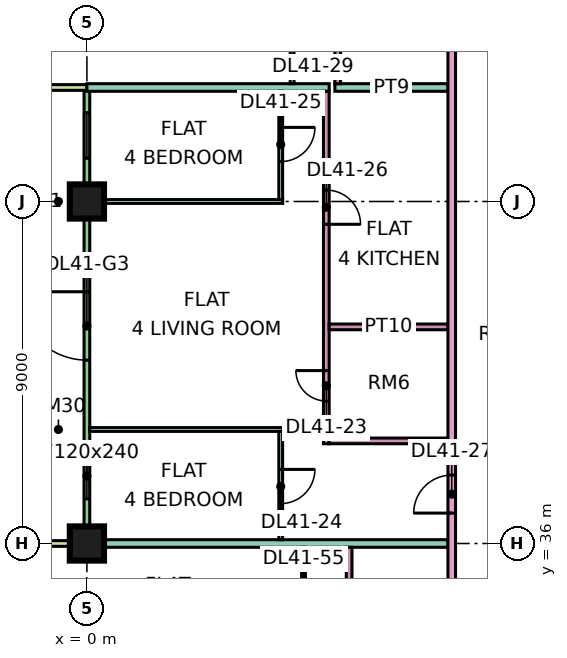
"""IFC4 building model, lengths in metres.
Left out: names, types, materials, properties, quantities, classifications, styles, units other than length and angle.
Written with IfcOpenShell. Run it as: python <this file> out.ifc"""

import sys

from ifc_helpers import new_model, si_unit, direction, frame, frame_2d, origin, origin_2d, place, context, subcontext, project, spatial, rectangle, extrude, element, fill, save


model = new_model("IFC4")
c1 = context("Model", 3, precision=1e-05, world=origin(), true_north=direction((0.0, 1.0)))
c2 = subcontext(c1, "Body", "Model", "MODEL_VIEW")
j1 = project(units=[si_unit("LENGTHUNIT", "METRE"), si_unit("PLANEANGLEUNIT", "RADIAN")], contexts=[c1])
p1 = place(None, origin())
s1 = spatial("IfcSite", under=j1, at=p1, CompositionType="ELEMENT")
p2 = place(p1, origin())
s2 = spatial("IfcBuilding", under=s1, at=p2, CompositionType="ELEMENT")
p3 = place(p2, frame((0.0, 0.0, 179.9)))
s3 = spatial("IfcBuildingStorey", under=s2, at=p3, CompositionType="ELEMENT", Elevation=179.9)
p4 = place(p3, frame((0.0, 36.0, 0.0), z_axis=(0.0, 0.0, 1.0), x_axis=(1.0, 0.0, 0.0)))
e1 = element("IfcColumn", 1, at=p4, inside=s3, PredefinedType="COLUMN", context=c2, shape_type="SweptSolid", body=[
    extrude(rectangle(XDim=0.9, YDim=0.9, at=origin_2d()), origin(), (0.0, 0.0, 1.0), 3.75),
])
p5 = place(p3, frame((0.0, 45.0, 0.0), z_axis=(0.0, 0.0, 1.0), x_axis=(1.0, 0.0, 0.0)))
e2 = element("IfcColumn", 2, at=p5, inside=s3, PredefinedType="COLUMN", context=c2, shape_type="SweptSolid", body=[
    extrude(rectangle(XDim=0.9, YDim=0.9, at=origin_2d()), origin(), (0.0, 0.0, 1.0), 3.75),
])
p6 = place(p3, frame((0.0, 47.925, 0.0), z_axis=(0.0, 0.0, 1.0), x_axis=(0.0, -1.0, 0.0)))
e3 = element("IfcWall", 3, at=p6, inside=s3, PredefinedType="SOLIDWALL", context=c2, shape_type="SweptSolid", body=[
    extrude(rectangle(XDim=11.85, YDim=0.15, at=frame_2d((5.925, 0.0))), origin(), (0.0, 0.0, 1.0), 3.35),
])
p7 = place(p6, frame((0.587, 0.0, 0.45)))
e4 = element("IfcOpeningElement", 4, at=p7, cuts=e3, PredefinedType="OPENING", context=c2, shape_type="SweptSolid", body=[
    extrude(rectangle(XDim=1.2, YDim=2.4, at=frame_2d((0.6, 1.2))), frame((0.0, 0.085, 0.0), z_axis=(0.0, -1.0, 0.0), x_axis=(1.0, 0.0, 0.0)), (0.0, 0.0, 1.0), 0.17),
])
p8 = place(p6, frame((5.3, 0.0, 0.0)))
e5 = element("IfcOpeningElement", 5, at=p8, cuts=e3, PredefinedType="OPENING", context=c2, shape_type="SweptSolid", body=[
    extrude(rectangle(XDim=1.8, YDim=2.4, at=frame_2d((0.9, 1.2))), frame((0.0, 0.085, 0.0), z_axis=(0.0, -1.0, 0.0), x_axis=(1.0, 0.0, 0.0)), (0.0, 0.0, 1.0), 0.17),
])
p9 = place(p6, frame((9.55, 0.0, 0.45)))
e6 = element("IfcOpeningElement", 6, at=p9, cuts=e3, PredefinedType="OPENING", context=c2, shape_type="SweptSolid", body=[
    extrude(rectangle(XDim=1.2, YDim=2.4, at=frame_2d((0.6, 1.2))), frame((0.0, 0.085, 0.0), z_axis=(0.0, -1.0, 0.0), x_axis=(1.0, 0.0, 0.0)), (0.0, 0.0, 1.0), 0.17),
])
for number, where, z_axis, x_axis in (
    (7, (-1.5, 48.0, 0.0), (0.0, 0.0, 1.0), (1.0, 0.0, 0.0)),
    (8, (-1.5, 36.0, 0.0), (0.0, 0.0, 1.0), (1.0, 0.0, 0.0)),
):
    element("IfcWall", number, at=place(p3, frame(where, z_axis=z_axis, x_axis=x_axis)), inside=s3, PredefinedType="SOLIDWALL", context=c2, shape_type="SweptSolid", body=[
        extrude(rectangle(XDim=1.5, YDim=0.15, at=frame_2d((0.75, 0.0))), origin(), (0.0, 0.0, 1.0), 3.35),
    ])
e9 = element("IfcWall", 9, at=p4, inside=s3, PredefinedType="PARTITIONING", context=c2, shape_type="SweptSolid", body=[
    extrude(rectangle(XDim=9.5, YDim=0.2, at=frame_2d((4.75, 0.0))), origin(), (0.0, 0.0, 1.0), 3.35),
])
p10 = place(p3, frame((0.0, 48.0, 0.0), z_axis=(0.0, 0.0, 1.0), x_axis=(1.0, 0.0, 0.0)))
e10 = element("IfcWall", 10, at=p10, inside=s3, PredefinedType="PARTITIONING", context=c2, shape_type="SweptSolid", body=[
    extrude(rectangle(XDim=6.375, YDim=0.2, at=frame_2d((3.188, 0.0))), origin(), (0.0, 0.0, 1.0), 3.35),
])
for number, where, z_axis, x_axis in (
    (11, (0.074, 39.0, 0.0), (0.0, 0.0, 1.0), (1.0, 0.0, 0.0)),
    (12, (0.074, 45.0, 0.0), (0.0, 0.0, 1.0), (1.0, 0.0, 0.0)),
):
    element("IfcWall", number, at=place(p3, frame(where, z_axis=z_axis, x_axis=x_axis)), inside=s3, PredefinedType="PARTITIONING", context=c2, shape_type="SweptSolid", body=[
        extrude(rectangle(XDim=5.076, YDim=0.1, at=frame_2d((2.538, 0.0))), origin(), (0.0, 0.0, 1.0), 3.35),
    ])
p11 = place(p3, frame((5.1, 36.1, 0.0), z_axis=(0.0, 0.0, 1.0), x_axis=(0.0, 1.0, 0.0)))
e13 = element("IfcWall", 13, at=p11, inside=s3, PredefinedType="PARTITIONING", context=c2, shape_type="SweptSolid", body=[
    extrude(rectangle(XDim=2.85, YDim=0.1, at=frame_2d((1.425, 0.0))), origin(), (0.0, 0.0, 1.0), 3.35),
])
p12 = place(p11, frame((0.95, 0.0, 0.0)))
e14 = element("IfcOpeningElement", 14, at=p12, cuts=e13, PredefinedType="OPENING", context=c2, shape_type="SweptSolid", body=[
    extrude(rectangle(XDim=0.9, YDim=2.1, at=frame_2d((0.45, 1.05))), frame((0.0, 0.06, 0.0), z_axis=(0.0, -1.0, 0.0), x_axis=(1.0, 0.0, 0.0)), (0.0, 0.0, 1.0), 0.12),
])
p13 = place(p3, frame((5.1, 45.05, 0.0), z_axis=(0.0, 0.0, 1.0), x_axis=(0.0, 1.0, 0.0)))
e15 = element("IfcWall", 15, at=p13, inside=s3, PredefinedType="PARTITIONING", context=c2, shape_type="SweptSolid", body=[
    extrude(rectangle(XDim=2.85, YDim=0.1, at=frame_2d((1.425, 0.0))), origin(), (0.0, 0.0, 1.0), 3.35),
])
p14 = place(p13, frame((1.0, 0.0, 0.0)))
e16 = element("IfcOpeningElement", 16, at=p14, cuts=e15, PredefinedType="OPENING", context=c2, shape_type="SweptSolid", body=[
    extrude(rectangle(XDim=0.9, YDim=2.1, at=frame_2d((0.45, 1.05))), frame((0.0, 0.06, 0.0), z_axis=(0.0, -1.0, 0.0), x_axis=(1.0, 0.0, 0.0)), (0.0, 0.0, 1.0), 0.12),
])
p15 = place(p3, frame((5.4, 48.1, 0.0), z_axis=(0.0, 0.0, 1.0), x_axis=(0.0, 1.0, 0.0)))
e17 = element("IfcWall", 17, at=p15, inside=s3, PredefinedType="PARTITIONING", context=c2, shape_type="SweptSolid", body=[
    extrude(rectangle(XDim=5.95, YDim=0.1, at=frame_2d((2.975, 0.0))), origin(), (0.0, 0.0, 1.0), 3.35),
])
p16 = place(p15, frame((0.95, 0.0, 0.0)))
e18 = element("IfcOpeningElement", 18, at=p16, cuts=e17, PredefinedType="OPENING", context=c2, shape_type="SweptSolid", body=[
    extrude(rectangle(XDim=0.9, YDim=2.1, at=frame_2d((0.45, 1.05))), frame((0.0, 0.06, 0.0), z_axis=(0.0, -1.0, 0.0), x_axis=(1.0, 0.0, 0.0)), (0.0, 0.0, 1.0), 0.12),
])
p17 = place(p15, frame((3.95, 0.0, 0.0)))
e19 = element("IfcOpeningElement", 19, at=p17, cuts=e17, PredefinedType="OPENING", context=c2, shape_type="SweptSolid", body=[
    extrude(rectangle(XDim=0.9, YDim=2.1, at=frame_2d((0.45, 1.05))), frame((0.0, 0.06, 0.0), z_axis=(0.0, -1.0, 0.0), x_axis=(1.0, 0.0, 0.0)), (0.0, 0.0, 1.0), 0.12),
])
p18 = place(p3, frame((5.7, 29.95, 0.0), z_axis=(0.0, 0.0, 1.0), x_axis=(0.0, 1.0, 0.0)))
e20 = element("IfcWall", 20, at=p18, inside=s3, PredefinedType="PARTITIONING", context=c2, shape_type="SweptSolid", body=[
    extrude(rectangle(XDim=5.95, YDim=0.1, at=frame_2d((2.975, 0.0))), origin(), (0.0, 0.0, 1.0), 3.35),
])
p19 = place(p18, frame((1.1, 0.0, 0.0)))
e21 = element("IfcOpeningElement", 21, at=p19, cuts=e20, PredefinedType="OPENING", context=c2, shape_type="SweptSolid", body=[
    extrude(rectangle(XDim=0.9, YDim=2.1, at=frame_2d((0.45, 1.05))), frame((0.0, 0.06, 0.0), z_axis=(0.0, -1.0, 0.0), x_axis=(1.0, 0.0, 0.0)), (0.0, 0.0, 1.0), 0.12),
])
p20 = place(p18, frame((4.1, 0.0, 0.0)))
e22 = element("IfcOpeningElement", 22, at=p20, cuts=e20, PredefinedType="OPENING", context=c2, shape_type="SweptSolid", body=[
    extrude(rectangle(XDim=0.9, YDim=2.1, at=frame_2d((0.45, 1.05))), frame((0.0, 0.06, 0.0), z_axis=(0.0, -1.0, 0.0), x_axis=(1.0, 0.0, 0.0)), (0.0, 0.0, 1.0), 0.12),
])
p21 = place(p3, frame((6.3, 38.625, 0.0), z_axis=(0.0, 0.0, 1.0), x_axis=(0.0, 1.0, 0.0)))
e23 = element("IfcWall", 23, at=p21, inside=s3, PredefinedType="PARTITIONING", context=c2, shape_type="SweptSolid", body=[
    extrude(rectangle(XDim=9.275, YDim=0.15, at=frame_2d((4.637, 0.0))), origin(), (0.0, 0.0, 1.0), 3.35),
])
p22 = place(p21, frame((1.125, 0.0, 0.0)))
e24 = element("IfcOpeningElement", 24, at=p22, cuts=e23, PredefinedType="OPENING", context=c2, shape_type="SweptSolid", body=[
    extrude(rectangle(XDim=0.8, YDim=2.1, at=frame_2d((0.4, 1.05))), frame((0.0, 0.085, 0.0), z_axis=(0.0, -1.0, 0.0), x_axis=(1.0, 0.0, 0.0)), (0.0, 0.0, 1.0), 0.17),
])
p23 = place(p21, frame((5.775, 0.0, 0.0)))
e25 = element("IfcOpeningElement", 25, at=p23, cuts=e23, PredefinedType="OPENING", context=c2, shape_type="SweptSolid", body=[
    extrude(rectangle(XDim=0.9, YDim=2.1, at=frame_2d((0.45, 1.05))), frame((0.0, 0.085, 0.0), z_axis=(0.0, -1.0, 0.0), x_axis=(1.0, 0.0, 0.0)), (0.0, 0.0, 1.0), 0.17),
])
for number, where, z_axis, x_axis in (
    (26, (6.375, 38.7, 0.0), (0.0, 0.0, 1.0), (1.0, 0.0, 0.0)),
    (27, (6.375, 41.7, 0.0), (0.0, 0.0, 1.0), (1.0, 0.0, 0.0)),
):
    element("IfcWall", number, at=place(p3, frame(where, z_axis=z_axis, x_axis=x_axis)), inside=s3, PredefinedType="PARTITIONING", context=c2, shape_type="SweptSolid", body=[
        extrude(rectangle(XDim=3.125, YDim=0.15, at=frame_2d((1.562, 0.0))), origin(), (0.0, 0.0, 1.0), 3.35),
    ])
p24 = place(p3, frame((6.525, 48.0, 0.0), z_axis=(0.0, 0.0, 1.0), x_axis=(1.0, 0.0, 0.0)))
e28 = element("IfcWall", 28, at=p24, inside=s3, PredefinedType="PARTITIONING", context=c2, shape_type="SweptSolid", body=[
    extrude(rectangle(XDim=2.975, YDim=0.2, at=frame_2d((1.488, 0.0))), origin(), (0.0, 0.0, 1.0), 3.35),
])
p25 = place(p3, frame((6.6, 48.1, 0.0), z_axis=(0.0, 0.0, 1.0), x_axis=(0.0, 1.0, 0.0)))
e29 = element("IfcWall", 29, at=p25, inside=s3, PredefinedType="PARTITIONING", context=c2, shape_type="SweptSolid", body=[
    extrude(rectangle(XDim=9.275, YDim=0.15, at=frame_2d((4.637, 0.0))), origin(), (0.0, 0.0, 1.0), 3.35),
])
p26 = place(p25, frame((6.8, 0.0, 0.0)))
e30 = element("IfcOpeningElement", 30, at=p26, cuts=e29, PredefinedType="OPENING", context=c2, shape_type="SweptSolid", body=[
    extrude(rectangle(XDim=0.8, YDim=2.1, at=frame_2d((0.4, 1.05))), frame((0.0, 0.085, 0.0), z_axis=(0.0, -1.0, 0.0), x_axis=(1.0, 0.0, 0.0)), (0.0, 0.0, 1.0), 0.17),
])
p27 = place(p25, frame((2.15, 0.0, 0.0)))
e31 = element("IfcOpeningElement", 31, at=p27, cuts=e29, PredefinedType="OPENING", context=c2, shape_type="SweptSolid", body=[
    extrude(rectangle(XDim=0.9, YDim=2.1, at=frame_2d((0.45, 1.05))), frame((0.0, 0.085, 0.0), z_axis=(0.0, -1.0, 0.0), x_axis=(1.0, 0.0, 0.0)), (0.0, 0.0, 1.0), 0.17),
])
p28 = place(p3, frame((6.9, 26.925, 0.0), z_axis=(0.0, 0.0, 1.0), x_axis=(0.0, 1.0, 0.0)))
e32 = element("IfcWall", 32, at=p28, inside=s3, PredefinedType="PARTITIONING", context=c2, shape_type="SweptSolid", body=[
    extrude(rectangle(XDim=8.975, YDim=0.15, at=frame_2d((4.487, 0.0))), origin(), (0.0, 0.0, 1.0), 3.35),
])
p29 = place(p28, frame((0.975, 0.0, 0.0)))
e33 = element("IfcOpeningElement", 33, at=p29, cuts=e32, PredefinedType="OPENING", context=c2, shape_type="SweptSolid", body=[
    extrude(rectangle(XDim=0.8, YDim=2.1, at=frame_2d((0.4, 1.05))), frame((0.0, 0.085, 0.0), z_axis=(0.0, -1.0, 0.0), x_axis=(1.0, 0.0, 0.0)), (0.0, 0.0, 1.0), 0.17),
])
p30 = place(p28, frame((5.475, 0.0, 0.0)))
e34 = element("IfcOpeningElement", 34, at=p30, cuts=e32, PredefinedType="OPENING", context=c2, shape_type="SweptSolid", body=[
    extrude(rectangle(XDim=0.9, YDim=2.1, at=frame_2d((0.45, 1.05))), frame((0.0, 0.085, 0.0), z_axis=(0.0, -1.0, 0.0), x_axis=(1.0, 0.0, 0.0)), (0.0, 0.0, 1.0), 0.17),
])
p31 = place(p3, frame((9.6, 20.0, 0.0), z_axis=(0.0, 0.0, 1.0), x_axis=(0.0, 1.0, 0.0)))
e35 = element("IfcWall", 35, at=p31, inside=s3, PredefinedType="PARTITIONING", context=c2, shape_type="SweptSolid", body=[
    extrude(rectangle(XDim=44.35, YDim=0.2, at=frame_2d((22.175, 0.0))), origin(), (0.0, 0.0, 1.0), 3.35),
])
p32 = place(p31, frame((16.8, 0.0, 0.0)))
e36 = element("IfcOpeningElement", 36, at=p32, cuts=e35, PredefinedType="OPENING", context=c2, shape_type="SweptSolid", body=[
    extrude(rectangle(XDim=1.0, YDim=2.1, at=frame_2d((0.5, 1.05))), frame((0.0, 0.11, 0.0), z_axis=(0.0, -1.0, 0.0), x_axis=(1.0, 0.0, 0.0)), (0.0, 0.0, 1.0), 0.22),
])
p33 = place(p31, frame((40.65, 0.0, 0.0)))
e37 = element("IfcOpeningElement", 37, at=p33, cuts=e35, PredefinedType="OPENING", context=c2, shape_type="SweptSolid", body=[
    extrude(rectangle(XDim=1.0, YDim=2.1, at=frame_2d((0.5, 1.05))), frame((0.0, 0.11, 0.0), z_axis=(0.0, -1.0, 0.0), x_axis=(1.0, 0.0, 0.0)), (0.0, 0.0, 1.0), 0.22),
])
p34 = place(p31, frame((0.6, 0.0, 0.0)))
e38 = element("IfcOpeningElement", 38, at=p34, cuts=e35, PredefinedType="OPENING", context=c2, shape_type="SweptSolid", body=[
    extrude(rectangle(XDim=1.2, YDim=2.1, at=frame_2d((0.6, 1.05))), frame((0.0, 0.11, 0.0), z_axis=(0.0, -1.0, 0.0), x_axis=(1.0, 0.0, 0.0)), (0.0, 0.0, 1.0), 0.22),
])
p35 = place(p31, frame((4.2, 0.0, 0.0)))
e39 = element("IfcOpeningElement", 39, at=p35, cuts=e35, PredefinedType="OPENING", context=c2, shape_type="SweptSolid", body=[
    extrude(rectangle(XDim=1.0, YDim=2.1, at=frame_2d((0.5, 1.05))), frame((0.0, 0.11, 0.0), z_axis=(0.0, -1.0, 0.0), x_axis=(1.0, 0.0, 0.0)), (0.0, 0.0, 1.0), 0.22),
])
p36 = place(p7, origin())
e40 = element("IfcWindow", 40, at=p36, inside=s3, PartitioningType="SINGLE_PANEL", PredefinedType="WINDOW", context=c2, shape_type="SweptSolid", body=[
    extrude(rectangle(XDim=1.2, YDim=2.4, at=frame_2d((0.6, 1.2))), frame((0.0, 0.03, 0.0), z_axis=(0.0, -1.0, 0.0), x_axis=(1.0, 0.0, 0.0)), (0.0, 0.0, 1.0), 0.06),
])
fill(e4, e40)
p37 = place(p8, frame((1.8, 0.0, 0.0), z_axis=(0.0, 0.0, 1.0), x_axis=(-1.0, 0.0, 0.0)))
e41 = element("IfcDoor", 41, at=p37, inside=s3, OperationType="DOUBLE_DOOR_SINGLE_SWING", PredefinedType="DOOR", context=c2, shape_type="SweptSolid", body=[
    extrude(rectangle(XDim=1.8, YDim=2.4, at=frame_2d((0.9, 1.2))), frame((0.0, 0.025, 0.0), z_axis=(0.0, -1.0, 0.0), x_axis=(1.0, 0.0, 0.0)), (0.0, 0.0, 1.0), 0.05),
])
fill(e5, e41)
p38 = place(p9, origin())
e42 = element("IfcWindow", 42, at=p38, inside=s3, PartitioningType="SINGLE_PANEL", PredefinedType="WINDOW", context=c2, shape_type="SweptSolid", body=[
    extrude(rectangle(XDim=1.2, YDim=2.4, at=frame_2d((0.6, 1.2))), frame((0.0, 0.03, 0.0), z_axis=(0.0, -1.0, 0.0), x_axis=(1.0, 0.0, 0.0)), (0.0, 0.0, 1.0), 0.06),
])
fill(e6, e42)
p39 = place(p22, frame((0.8, 0.0, 0.0), z_axis=(0.0, 0.0, 1.0), x_axis=(-1.0, 0.0, 0.0)))
e43 = element("IfcDoor", 43, at=p39, inside=s3, OperationType="SINGLE_SWING_RIGHT", PredefinedType="DOOR", context=c2, shape_type="SweptSolid", body=[
    extrude(rectangle(XDim=0.8, YDim=2.1, at=frame_2d((0.4, 1.05))), frame((0.0, 0.025, 0.0), z_axis=(0.0, -1.0, 0.0), x_axis=(1.0, 0.0, 0.0)), (0.0, 0.0, 1.0), 0.05),
])
fill(e24, e43)
p40 = place(p12, origin())
e44 = element("IfcDoor", 44, at=p40, inside=s3, OperationType="SINGLE_SWING_RIGHT", PredefinedType="DOOR", context=c2, shape_type="SweptSolid", body=[
    extrude(rectangle(XDim=0.9, YDim=2.1, at=frame_2d((0.45, 1.05))), frame((0.0, 0.025, 0.0), z_axis=(0.0, -1.0, 0.0), x_axis=(1.0, 0.0, 0.0)), (0.0, 0.0, 1.0), 0.05),
])
fill(e14, e44)
p41 = place(p14, origin())
e45 = element("IfcDoor", 45, at=p41, inside=s3, OperationType="SINGLE_SWING_RIGHT", PredefinedType="DOOR", context=c2, shape_type="SweptSolid", body=[
    extrude(rectangle(XDim=0.9, YDim=2.1, at=frame_2d((0.45, 1.05))), frame((0.0, 0.025, 0.0), z_axis=(0.0, -1.0, 0.0), x_axis=(1.0, 0.0, 0.0)), (0.0, 0.0, 1.0), 0.05),
])
fill(e16, e45)
p42 = place(p23, frame((0.9, 0.0, 0.0), z_axis=(0.0, 0.0, 1.0), x_axis=(-1.0, 0.0, 0.0)))
e46 = element("IfcDoor", 46, at=p42, inside=s3, OperationType="SINGLE_SWING_LEFT", PredefinedType="DOOR", context=c2, shape_type="SweptSolid", body=[
    extrude(rectangle(XDim=0.9, YDim=2.1, at=frame_2d((0.45, 1.05))), frame((0.0, 0.025, 0.0), z_axis=(0.0, -1.0, 0.0), x_axis=(1.0, 0.0, 0.0)), (0.0, 0.0, 1.0), 0.05),
])
fill(e25, e46)
p43 = place(p32, origin())
e47 = element("IfcDoor", 47, at=p43, inside=s3, OperationType="SINGLE_SWING_LEFT", PredefinedType="DOOR", context=c2, shape_type="SweptSolid", body=[
    extrude(rectangle(XDim=1.0, YDim=2.1, at=frame_2d((0.5, 1.05))), frame((0.0, 0.025, 0.0), z_axis=(0.0, -1.0, 0.0), x_axis=(1.0, 0.0, 0.0)), (0.0, 0.0, 1.0), 0.05),
])
fill(e36, e47)
save(model, sys.argv[1])
